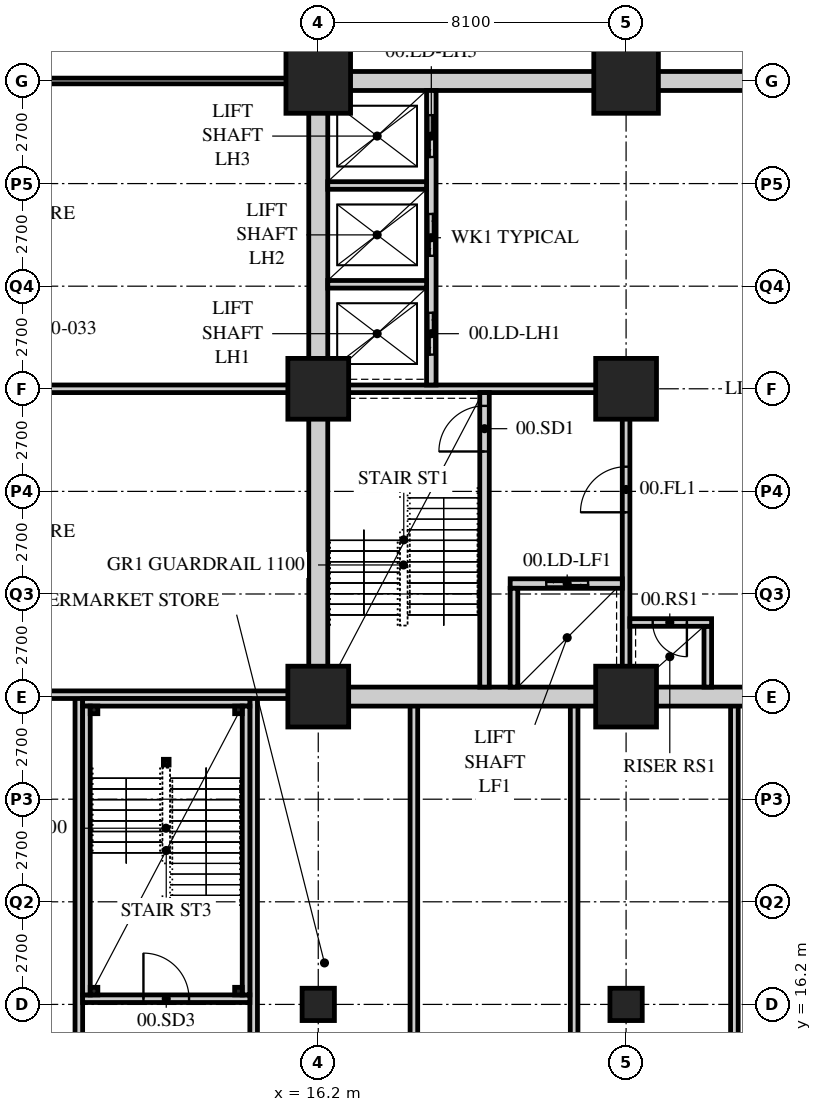
"""IFC4 building model, lengths in metres.
Left out: names, types, materials, properties, quantities, classifications, styles, units other than length and angle.
Written with IfcOpenShell. Run it as: python <this file> out.ifc"""

import sys

from ifc_helpers import new_model, si_unit, direction, frame, frame_2d, origin, origin_2d, place, context, subcontext, project, spatial, rectangle, hollow_rectangle, extrude, element, fill, save


model = new_model("IFC4")
c1 = context("Model", 3, precision=1e-05, world=origin(), true_north=direction((0.0, 1.0)))
c2 = subcontext(c1, "Body", "Model", "MODEL_VIEW")
j1 = project(units=[si_unit("LENGTHUNIT", "METRE"), si_unit("PLANEANGLEUNIT", "RADIAN")], contexts=[c1])
p1 = place(None, origin())
s1 = spatial("IfcSite", under=j1, at=p1, CompositionType="ELEMENT")
p2 = place(p1, origin())
s2 = spatial("IfcBuilding", under=s1, at=p2, CompositionType="ELEMENT")
p3 = place(p2, origin())
s3 = spatial("IfcBuildingStorey", under=s2, at=p3, CompositionType="ELEMENT", Elevation=0.0)
p4 = place(p3, frame((16.2, 16.2, 0.0), z_axis=(0.0, 0.0, 1.0), x_axis=(1.0, 0.0, 0.0)))
e1 = element("IfcColumn", 1, at=p4, inside=s3, PredefinedType="COLUMN", context=c2, shape_type="SweptSolid", body=[
    extrude(hollow_rectangle(XDim=0.85, YDim=0.85, WallThickness=0.085, at=origin_2d()), origin(), (0.0, 0.0, 1.0), 6.0),
])
for number, where, z_axis, x_axis in (
    (2, (16.2, 24.3, 0.0), (0.0, 0.0, 1.0), (1.0, 0.0, 0.0)),
    (3, (16.2, 32.4, 0.0), (0.0, 0.0, 1.0), (1.0, 0.0, 0.0)),
):
    element("IfcColumn", number, at=place(p3, frame(where, z_axis=z_axis, x_axis=x_axis)), inside=s3, PredefinedType="COLUMN", context=c2, shape_type="SweptSolid", body=[
        extrude(hollow_rectangle(XDim=1.6, YDim=1.6, WallThickness=0.15, at=origin_2d()), origin(), (0.0, 0.0, 1.0), 6.0),
    ])
p5 = place(p3, frame((16.2, 40.5, 0.0), z_axis=(0.0, 0.0, 1.0), x_axis=(1.0, 0.0, 0.0)))
e4 = element("IfcColumn", 4, at=p5, inside=s3, PredefinedType="COLUMN", context=c2, shape_type="SweptSolid", body=[
    extrude(hollow_rectangle(XDim=1.7, YDim=1.7, WallThickness=0.16, at=origin_2d()), origin(), (0.0, 0.0, 1.0), 6.0),
])
p6 = place(p3, frame((24.3, 16.2, 0.0), z_axis=(0.0, 0.0, 1.0), x_axis=(1.0, 0.0, 0.0)))
e5 = element("IfcColumn", 5, at=p6, inside=s3, PredefinedType="COLUMN", context=c2, shape_type="SweptSolid", body=[
    extrude(hollow_rectangle(XDim=0.85, YDim=0.85, WallThickness=0.085, at=origin_2d()), origin(), (0.0, 0.0, 1.0), 6.0),
])
for number, where, z_axis, x_axis in (
    (6, (24.3, 24.3, 0.0), (0.0, 0.0, 1.0), (1.0, 0.0, 0.0)),
    (7, (24.3, 32.4, 0.0), (0.0, 0.0, 1.0), (1.0, 0.0, 0.0)),
):
    element("IfcColumn", number, at=place(p3, frame(where, z_axis=z_axis, x_axis=x_axis)), inside=s3, PredefinedType="COLUMN", context=c2, shape_type="SweptSolid", body=[
        extrude(hollow_rectangle(XDim=1.6, YDim=1.6, WallThickness=0.15, at=origin_2d()), origin(), (0.0, 0.0, 1.0), 6.0),
    ])
p7 = place(p3, frame((24.3, 40.5, 0.0), z_axis=(0.0, 0.0, 1.0), x_axis=(1.0, 0.0, 0.0)))
e8 = element("IfcColumn", 8, at=p7, inside=s3, PredefinedType="COLUMN", context=c2, shape_type="SweptSolid", body=[
    extrude(hollow_rectangle(XDim=1.7, YDim=1.7, WallThickness=0.16, at=origin_2d()), origin(), (0.0, 0.0, 1.0), 6.0),
])
p8 = place(p3, frame((16.0, 40.5, 0.0), z_axis=(0.0, 0.0, 1.0), x_axis=(-1.0, 0.0, 0.0)))
e9 = element("IfcWall", 9, at=p8, inside=s3, PredefinedType="PARTITIONING", context=c2, shape_type="SweptSolid", body=[
    extrude(rectangle(XDim=12.4, YDim=0.15, at=frame_2d((6.2, 0.0))), origin(), (0.0, 0.0, 1.0), 5.138),
])
p9 = place(p3, frame((3.6, 32.4, 0.0), z_axis=(0.0, 0.0, 1.0), x_axis=(1.0, 0.0, 0.0)))
e10 = element("IfcWall", 10, at=p9, inside=s3, PredefinedType="SOLIDWALL", context=c2, shape_type="SweptSolid", body=[
    extrude(rectangle(XDim=12.6, YDim=0.2, at=frame_2d((6.3, 0.0))), origin(), (0.0, 0.0, 1.0), 5.138),
])
for number, where, z_axis, x_axis in (
    (11, (9.9, 3.6, 0.0), (0.0, 0.0, 1.0), (0.0, 1.0, 0.0)),
    (12, (14.5, 3.6, 0.0), (0.0, 0.0, 1.0), (0.0, 1.0, 0.0)),
    (13, (18.717, 3.6, 0.0), (0.0, 0.0, 1.0), (0.0, 1.0, 0.0)),
    (14, (22.933, 3.6, 0.0), (0.0, 0.0, 1.0), (0.0, 1.0, 0.0)),
    (15, (27.15, 3.6, 0.0), (0.0, 0.0, 1.0), (0.0, 1.0, 0.0)),
):
    element("IfcWall", number, at=place(p3, frame(where, z_axis=z_axis, x_axis=x_axis)), inside=s3, PredefinedType="SOLIDWALL", context=c2, shape_type="SweptSolid", body=[
        extrude(rectangle(XDim=20.7, YDim=0.2, at=frame_2d((10.35, 0.0))), origin(), (0.0, 0.0, 1.0), 5.75),
    ])
p10 = place(p3, frame((3.6, 24.35, 0.0), z_axis=(0.0, 0.0, 1.0), x_axis=(1.0, 0.0, 0.0)))
e16 = element("IfcWall", 16, at=p10, inside=s3, PredefinedType="SOLIDWALL", context=c2, shape_type="SweptSolid", body=[
    extrude(rectangle(XDim=12.6, YDim=0.2, at=frame_2d((6.3, 0.0))), origin(), (0.0, 0.0, 1.0), 5.138),
])
p11 = place(p3, frame((15.95, 24.3, 0.0), z_axis=(0.0, 0.0, 1.0), x_axis=(1.0, 0.0, 0.0)))
e17 = element("IfcWall", 17, at=p11, inside=s3, PredefinedType="SOLIDWALL", context=c2, shape_type="SweptSolid", body=[
    extrude(rectangle(XDim=24.8, YDim=0.5, at=frame_2d((12.4, 0.0))), origin(), (0.0, 0.0, 1.0), 5.1),
])
p12 = place(p11, frame((11.5, 0.0, 0.0)))
e18 = element("IfcOpeningElement", 18, at=p12, cuts=e17, PredefinedType="OPENING", context=c2, shape_type="SweptSolid", body=[
    extrude(rectangle(XDim=1.8, YDim=2.4, at=frame_2d((0.9, 1.2))), frame((0.0, 0.26, 0.0), z_axis=(0.0, -1.0, 0.0), x_axis=(1.0, 0.0, 0.0)), (0.0, 0.0, 1.0), 0.52),
])
p13 = place(p3, frame((15.95, 40.5, 0.0), z_axis=(0.0, 0.0, 1.0), x_axis=(1.0, 0.0, 0.0)))
e19 = element("IfcWall", 19, at=p13, inside=s3, PredefinedType="SOLIDWALL", context=c2, shape_type="SweptSolid", body=[
    extrude(rectangle(XDim=24.8, YDim=0.5, at=frame_2d((12.4, 0.0))), origin(), (0.0, 0.0, 1.0), 5.1),
])
p14 = place(p13, frame((11.5, 0.0, 0.0)))
e20 = element("IfcOpeningElement", 20, at=p14, cuts=e19, PredefinedType="OPENING", context=c2, shape_type="SweptSolid", body=[
    extrude(rectangle(XDim=1.8, YDim=2.4, at=frame_2d((0.9, 1.2))), frame((0.0, 0.26, 0.0), z_axis=(0.0, -1.0, 0.0), x_axis=(1.0, 0.0, 0.0)), (0.0, 0.0, 1.0), 0.52),
])
p15 = place(p3, frame((16.2, 24.55, 0.0), z_axis=(0.0, 0.0, 1.0), x_axis=(0.0, 1.0, 0.0)))
e21 = element("IfcWall", 21, at=p15, inside=s3, PredefinedType="SOLIDWALL", context=c2, shape_type="SweptSolid", body=[
    extrude(rectangle(XDim=15.7, YDim=0.5, at=frame_2d((7.85, 0.0))), origin(), (0.0, 0.0, 1.0), 5.138),
])
p16 = place(p3, frame((16.45, 32.4, 0.0), z_axis=(0.0, 0.0, 1.0), x_axis=(1.0, 0.0, 0.0)))
e22 = element("IfcWall", 22, at=p16, inside=s3, PredefinedType="SOLIDWALL", context=c2, shape_type="SweptSolid", body=[
    extrude(rectangle(XDim=7.95, YDim=0.2, at=frame_2d((3.975, 0.0))), origin(), (0.0, 0.0, 1.0), 5.05),
])
p17 = place(p3, frame((24.3, 24.55, 0.0), z_axis=(0.0, 0.0, 1.0), x_axis=(0.0, 1.0, 0.0)))
e23 = element("IfcWall", 23, at=p17, inside=s3, PredefinedType="SOLIDWALL", context=c2, shape_type="SweptSolid", body=[
    extrude(rectangle(XDim=7.75, YDim=0.2, at=frame_2d((3.875, 0.0))), origin(), (0.0, 0.0, 1.0), 5.05),
])
p18 = place(p17, frame((4.6, 0.0, 0.0)))
e24 = element("IfcOpeningElement", 24, at=p18, cuts=e23, PredefinedType="OPENING", context=c2, shape_type="SweptSolid", body=[
    extrude(rectangle(XDim=1.2, YDim=2.1, at=frame_2d((0.6, 1.05))), frame((0.0, 0.11, 0.0), z_axis=(0.0, -1.0, 0.0), x_axis=(1.0, 0.0, 0.0)), (0.0, 0.0, 1.0), 0.22),
])
p19 = place(p3, frame((20.575, 24.55, 0.0), z_axis=(0.0, 0.0, 1.0), x_axis=(0.0, 1.0, 0.0)))
e25 = element("IfcWall", 25, at=p19, inside=s3, PredefinedType="SOLIDWALL", context=c2, shape_type="SweptSolid", body=[
    extrude(rectangle(XDim=7.75, YDim=0.25, at=frame_2d((3.875, 0.0))), origin(), (0.0, 0.0, 1.0), 5.75),
])
p20 = place(p19, frame((6.2, 0.0, 0.0)))
e26 = element("IfcOpeningElement", 26, at=p20, cuts=e25, PredefinedType="OPENING", context=c2, shape_type="SweptSolid", body=[
    extrude(rectangle(XDim=1.2, YDim=2.1, at=frame_2d((0.6, 1.05))), frame((0.0, 0.135, 0.0), z_axis=(0.0, -1.0, 0.0), x_axis=(1.0, 0.0, 0.0)), (0.0, 0.0, 1.0), 0.27),
])
p21 = place(p3, frame((21.25, 27.275, 0.0), z_axis=(0.0, 0.0, 1.0), x_axis=(1.0, 0.0, 0.0)))
e27 = element("IfcWall", 27, at=p21, inside=s3, PredefinedType="SOLIDWALL", context=c2, shape_type="SweptSolid", body=[
    extrude(rectangle(XDim=2.95, YDim=0.25, at=frame_2d((1.475, 0.0))), origin(), (0.0, 0.0, 1.0), 5.75),
])
p22 = place(p21, frame((0.95, 0.0, 0.0)))
e28 = element("IfcOpeningElement", 28, at=p22, cuts=e27, PredefinedType="OPENING", context=c2, shape_type="SweptSolid", body=[
    extrude(rectangle(XDim=1.1, YDim=2.4, at=frame_2d((0.55, 1.2))), frame((0.0, 0.135, 0.0), z_axis=(0.0, -1.0, 0.0), x_axis=(1.0, 0.0, 0.0)), (0.0, 0.0, 1.0), 0.27),
])
p23 = place(p3, frame((21.35, 24.55, 0.0), z_axis=(0.0, 0.0, 1.0), x_axis=(0.0, 1.0, 0.0)))
e29 = element("IfcWall", 29, at=p23, inside=s3, PredefinedType="SOLIDWALL", context=c2, shape_type="SweptSolid", body=[
    extrude(rectangle(XDim=2.6, YDim=0.2, at=frame_2d((1.3, 0.0))), origin(), (0.0, 0.0, 1.0), 5.75),
])
p24 = place(p3, frame((19.175, 32.5, 0.0), z_axis=(0.0, 0.0, 1.0), x_axis=(0.0, 1.0, 0.0)))
e30 = element("IfcWall", 30, at=p24, inside=s3, PredefinedType="SOLIDWALL", context=c2, shape_type="SweptSolid", body=[
    extrude(rectangle(XDim=7.75, YDim=0.25, at=frame_2d((3.875, 0.0))), origin(), (0.0, 0.0, 1.0), 5.75),
])
p25 = place(p24, frame((0.8, 0.0, 0.0)))
e31 = element("IfcOpeningElement", 31, at=p25, cuts=e30, PredefinedType="OPENING", context=c2, shape_type="SweptSolid", body=[
    extrude(rectangle(XDim=1.1, YDim=2.4, at=frame_2d((0.55, 1.2))), frame((0.0, 0.135, 0.0), z_axis=(0.0, -1.0, 0.0), x_axis=(1.0, 0.0, 0.0)), (0.0, 0.0, 1.0), 0.27),
])
p26 = place(p24, frame((3.4, 0.0, 0.0)))
e32 = element("IfcOpeningElement", 32, at=p26, cuts=e30, PredefinedType="OPENING", context=c2, shape_type="SweptSolid", body=[
    extrude(rectangle(XDim=1.1, YDim=2.4, at=frame_2d((0.55, 1.2))), frame((0.0, 0.135, 0.0), z_axis=(0.0, -1.0, 0.0), x_axis=(1.0, 0.0, 0.0)), (0.0, 0.0, 1.0), 0.27),
])
p27 = place(p24, frame((6.0, 0.0, 0.0)))
e33 = element("IfcOpeningElement", 33, at=p27, cuts=e30, PredefinedType="OPENING", context=c2, shape_type="SweptSolid", body=[
    extrude(rectangle(XDim=1.1, YDim=2.4, at=frame_2d((0.55, 1.2))), frame((0.0, 0.135, 0.0), z_axis=(0.0, -1.0, 0.0), x_axis=(1.0, 0.0, 0.0)), (0.0, 0.0, 1.0), 0.27),
])
for number, where, z_axis, x_axis in (
    (34, (16.45, 35.15, 0.0), (0.0, 0.0, 1.0), (1.0, 0.0, 0.0)),
    (35, (16.45, 37.75, 0.0), (0.0, 0.0, 1.0), (1.0, 0.0, 0.0)),
):
    element("IfcWall", number, at=place(p3, frame(where, z_axis=z_axis, x_axis=x_axis)), inside=s3, PredefinedType="SOLIDWALL", context=c2, shape_type="SweptSolid", body=[
        extrude(rectangle(XDim=2.6, YDim=0.2, at=frame_2d((1.3, 0.0))), origin(), (0.0, 0.0, 1.0), 5.75),
    ])
p28 = place(p3, frame((26.45, 24.55, 0.0), z_axis=(0.0, 0.0, 1.0), x_axis=(0.0, 1.0, 0.0)))
e36 = element("IfcWall", 36, at=p28, inside=s3, PredefinedType="SOLIDWALL", context=c2, shape_type="SweptSolid", body=[
    extrude(rectangle(XDim=1.6, YDim=0.2, at=frame_2d((0.8, 0.0))), origin(), (0.0, 0.0, 1.0), 5.75),
])
p29 = place(p3, frame((24.4, 26.25, 0.0), z_axis=(0.0, 0.0, 1.0), x_axis=(1.0, 0.0, 0.0)))
e37 = element("IfcWall", 37, at=p29, inside=s3, PredefinedType="SOLIDWALL", context=c2, shape_type="SweptSolid", body=[
    extrude(rectangle(XDim=2.15, YDim=0.2, at=frame_2d((1.075, 0.0))), origin(), (0.0, 0.0, 1.0), 5.75),
])
p30 = place(p29, frame((0.6, 0.0, 0.0)))
e38 = element("IfcOpeningElement", 38, at=p30, cuts=e37, PredefinedType="OPENING", context=c2, shape_type="SweptSolid", body=[
    extrude(rectangle(XDim=0.9, YDim=2.1, at=frame_2d((0.45, 1.05))), frame((0.0, 0.11, 0.0), z_axis=(0.0, -1.0, 0.0), x_axis=(1.0, 0.0, 0.0)), (0.0, 0.0, 1.0), 0.22),
])
p31 = place(p3, frame((10.0, 16.35, 0.0), z_axis=(0.0, 0.0, 1.0), x_axis=(1.0, 0.0, 0.0)))
e39 = element("IfcWall", 39, at=p31, inside=s3, PredefinedType="SOLIDWALL", context=c2, shape_type="SweptSolid", body=[
    extrude(rectangle(XDim=4.4, YDim=0.2, at=frame_2d((2.2, 0.0))), origin(), (0.0, 0.0, 1.0), 5.138),
])
p32 = place(p31, frame((1.6, 0.0, 0.0)))
e40 = element("IfcOpeningElement", 40, at=p32, cuts=e39, PredefinedType="OPENING", context=c2, shape_type="SweptSolid", body=[
    extrude(rectangle(XDim=1.2, YDim=2.1, at=frame_2d((0.6, 1.05))), frame((0.0, 0.11, 0.0), z_axis=(0.0, -1.0, 0.0), x_axis=(1.0, 0.0, 0.0)), (0.0, 0.0, 1.0), 0.22),
])
p33 = place(p3, frame((10.0, 24.15, 0.0), z_axis=(0.0, 0.0, 1.0), x_axis=(1.0, 0.0, 0.0)))
e41 = element("IfcWall", 41, at=p33, inside=s3, PredefinedType="SOLIDWALL", context=c2, shape_type="SweptSolid", body=[
    extrude(rectangle(XDim=4.4, YDim=0.2, at=frame_2d((2.2, 0.0))), origin(), (0.0, 0.0, 1.0), 5.138),
])
for number, where, z_axis, x_axis in (
    (42, (10.1, 16.45, 0.0), (0.0, 0.0, 1.0), (0.0, 1.0, 0.0)),
    (43, (14.3, 16.45, 0.0), (0.0, 0.0, 1.0), (0.0, 1.0, 0.0)),
):
    element("IfcWall", number, at=place(p3, frame(where, z_axis=z_axis, x_axis=x_axis)), inside=s3, PredefinedType="SOLIDWALL", context=c2, shape_type="SweptSolid", body=[
        extrude(rectangle(XDim=7.6, YDim=0.2, at=frame_2d((3.8, 0.0))), origin(), (0.0, 0.0, 1.0), 5.75),
    ])
for number, where, z_axis, x_axis in (
    (44, (10.3, 23.95, 0.0), (0.0, 0.0, 1.0), (1.0, 0.0, 0.0)),
    (45, (14.1, 23.95, 0.0), (0.0, 0.0, 1.0), (1.0, 0.0, 0.0)),
    (46, (10.3, 16.55, 0.0), (0.0, 0.0, 1.0), (1.0, 0.0, 0.0)),
    (47, (14.1, 16.55, 0.0), (0.0, 0.0, 1.0), (1.0, 0.0, 0.0)),
):
    element("IfcColumn", number, at=place(p3, frame(where, z_axis=z_axis, x_axis=x_axis)), inside=s3, PredefinedType="COLUMN", context=c2, shape_type="SweptSolid", body=[
        extrude(hollow_rectangle(XDim=0.2, YDim=0.2, WallThickness=0.012, at=origin_2d()), origin(), (0.0, 0.0, 1.0), 6.0),
    ])
p34 = place(p3, frame((12.2, 22.575, 0.0), z_axis=(0.0, 0.0, 1.0), x_axis=(1.0, 0.0, 0.0)))
e48 = element("IfcColumn", 48, at=p34, inside=s3, PredefinedType="COLUMN", context=c2, shape_type="SweptSolid", body=[
    extrude(hollow_rectangle(XDim=0.15, YDim=0.15, WallThickness=0.01, at=origin_2d()), origin(), (0.0, 0.0, 1.0), 6.0),
])
p35 = place(p20, origin())
e49 = element("IfcDoor", 49, at=p35, inside=s3, OperationType="SINGLE_SWING_LEFT", PredefinedType="DOOR", context=c2, shape_type="SweptSolid", body=[
    extrude(rectangle(XDim=1.2, YDim=2.1, at=frame_2d((0.6, 1.05))), frame((0.0, 0.025, 0.0), z_axis=(0.0, -1.0, 0.0), x_axis=(1.0, 0.0, 0.0)), (0.0, 0.0, 1.0), 0.05),
])
fill(e26, e49)
p36 = place(p18, origin())
e50 = element("IfcDoor", 50, at=p36, inside=s3, OperationType="SINGLE_SWING_LEFT", PredefinedType="DOOR", context=c2, shape_type="SweptSolid", body=[
    extrude(rectangle(XDim=1.2, YDim=2.1, at=frame_2d((0.6, 1.05))), frame((0.0, 0.025, 0.0), z_axis=(0.0, -1.0, 0.0), x_axis=(1.0, 0.0, 0.0)), (0.0, 0.0, 1.0), 0.05),
])
fill(e24, e50)
p37 = place(p30, origin())
e51 = element("IfcDoor", 51, at=p37, inside=s3, OperationType="SINGLE_SWING_LEFT", PredefinedType="DOOR", context=c2, shape_type="SweptSolid", body=[
    extrude(rectangle(XDim=0.9, YDim=2.1, at=frame_2d((0.45, 1.05))), frame((0.0, 0.025, 0.0), z_axis=(0.0, -1.0, 0.0), x_axis=(1.0, 0.0, 0.0)), (0.0, 0.0, 1.0), 0.05),
])
fill(e38, e51)
p38 = place(p25, origin())
e52 = element("IfcDoor", 52, at=p38, inside=s3, OperationType="DOUBLE_DOOR_SLIDING", PredefinedType="DOOR", context=c2, shape_type="SweptSolid", body=[
    extrude(rectangle(XDim=1.1, YDim=2.4, at=frame_2d((0.55, 1.2))), frame((0.0, 0.025, 0.0), z_axis=(0.0, -1.0, 0.0), x_axis=(1.0, 0.0, 0.0)), (0.0, 0.0, 1.0), 0.05),
])
fill(e31, e52)
p39 = place(p26, origin())
e53 = element("IfcDoor", 53, at=p39, inside=s3, OperationType="DOUBLE_DOOR_SLIDING", PredefinedType="DOOR", context=c2, shape_type="SweptSolid", body=[
    extrude(rectangle(XDim=1.1, YDim=2.4, at=frame_2d((0.55, 1.2))), frame((0.0, 0.025, 0.0), z_axis=(0.0, -1.0, 0.0), x_axis=(1.0, 0.0, 0.0)), (0.0, 0.0, 1.0), 0.05),
])
fill(e32, e53)
p40 = place(p27, origin())
e54 = element("IfcDoor", 54, at=p40, inside=s3, OperationType="DOUBLE_DOOR_SLIDING", PredefinedType="DOOR", context=c2, shape_type="SweptSolid", body=[
    extrude(rectangle(XDim=1.1, YDim=2.4, at=frame_2d((0.55, 1.2))), frame((0.0, 0.025, 0.0), z_axis=(0.0, -1.0, 0.0), x_axis=(1.0, 0.0, 0.0)), (0.0, 0.0, 1.0), 0.05),
])
fill(e33, e54)
p41 = place(p22, origin())
e55 = element("IfcDoor", 55, at=p41, inside=s3, OperationType="DOUBLE_DOOR_SLIDING", PredefinedType="DOOR", context=c2, shape_type="SweptSolid", body=[
    extrude(rectangle(XDim=1.1, YDim=2.4, at=frame_2d((0.55, 1.2))), frame((0.0, 0.025, 0.0), z_axis=(0.0, -1.0, 0.0), x_axis=(1.0, 0.0, 0.0)), (0.0, 0.0, 1.0), 0.05),
])
fill(e28, e55)
p42 = place(p32, origin())
e56 = element("IfcDoor", 56, at=p42, inside=s3, OperationType="SINGLE_SWING_LEFT", PredefinedType="DOOR", context=c2, shape_type="SweptSolid", body=[
    extrude(rectangle(XDim=1.2, YDim=2.1, at=frame_2d((0.6, 1.05))), frame((0.0, 0.025, 0.0), z_axis=(0.0, -1.0, 0.0), x_axis=(1.0, 0.0, 0.0)), (0.0, 0.0, 1.0), 0.05),
])
fill(e40, e56)
save(model, sys.argv[1])
